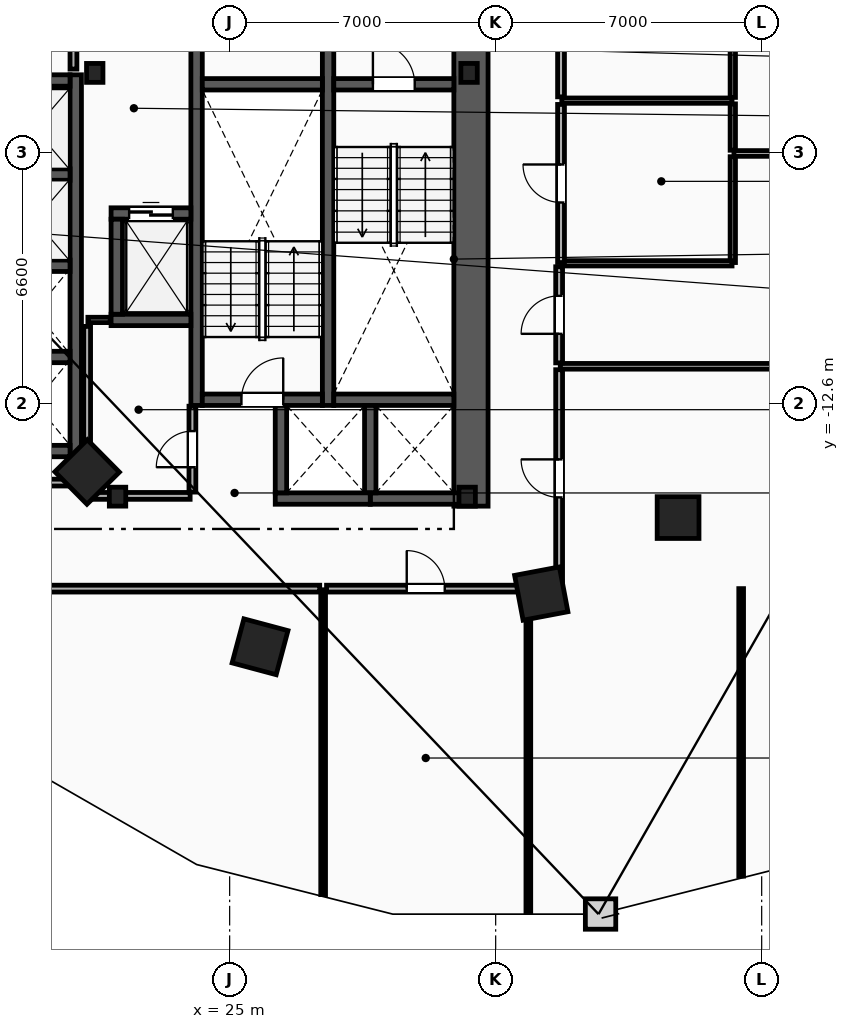
"""IFC4 building model, lengths in metres.
Left out: names, types, materials, properties, quantities, classifications, styles, units other than length and angle.
Written with IfcOpenShell. Run it as: python <this file> out.ifc"""

import sys

from ifc_helpers import new_model, si_unit, direction, frame, frame_2d, origin, origin_2d, place, context, subcontext, project, spatial, rectangle, i_section, extrude, element, fill, save


model = new_model("IFC4")
c1 = context("Model", 3, precision=1e-05, world=origin(), true_north=direction((0.0, 1.0)))
c2 = subcontext(c1, "Body", "Model", "MODEL_VIEW")
j1 = project(units=[si_unit("LENGTHUNIT", "METRE"), si_unit("PLANEANGLEUNIT", "RADIAN")], contexts=[c1])
p1 = place(None, origin())
s1 = spatial("IfcSite", under=j1, at=p1, CompositionType="ELEMENT")
p2 = place(p1, origin())
s2 = spatial("IfcBuilding", under=s1, at=p2, CompositionType="ELEMENT")
p3 = place(p2, frame((0.0, 0.0, 43.0)))
s3 = spatial("IfcBuildingStorey", under=s2, at=p3, CompositionType="ELEMENT", Elevation=43.0)
for number, where, z_axis, x_axis in (
    (1, (31.3, -3.9, 0.0), (0.0, 0.0, 1.0), (1.0, 0.0, 0.0)),
    (2, (21.45, -3.9, 0.0), (0.0, 0.0, 1.0), (1.0, 0.0, 0.0)),
    (3, (22.05, -15.05, 0.0), (0.0, 0.0, 1.0), (1.0, 0.0, 0.0)),
    (4, (31.25, -15.05, 0.0), (0.0, 0.0, 1.0), (1.0, 0.0, 0.0)),
):
    element("IfcColumn", number, at=place(p3, frame(where, z_axis=z_axis, x_axis=x_axis)), inside=s3, PredefinedType="COLUMN", context=c2, shape_type="SweptSolid", body=[
        extrude(i_section(OverallWidth=0.432, OverallDepth=0.498, WebThickness=0.056, FlangeThickness=0.089, FilletRadius=0.018, at=origin_2d()), origin(), (0.0, 0.0, 1.0), 3.8),
    ])
p4 = place(p3, frame((36.8, -15.6, 0.0), z_axis=(0.0, 0.0, 1.0), x_axis=(1.0, 0.0, 0.0)))
e5 = element("IfcColumn", 5, at=p4, inside=s3, PredefinedType="COLUMN", context=c2, shape_type="SweptSolid", body=[
    extrude(rectangle(XDim=1.1, YDim=1.1, at=origin_2d()), origin(), (0.0, 0.0, 1.0), 3.8),
])
for number, where, z_axis, x_axis in (
    (6, (21.25, -14.4, 0.0), (0.0, 0.0, 1.0), (0.703, -0.711, 0.0)),
    (7, (25.8, -19.0, 0.0), (0.0, 0.0, 1.0), (0.966, -0.259, 0.0)),
    (8, (33.2, -17.6, 0.0), (0.0, 0.0, 1.0), (0.983, 0.186, 0.0)),
):
    element("IfcColumn", number, at=place(p3, frame(where, z_axis=z_axis, x_axis=x_axis)), inside=s3, PredefinedType="COLUMN", context=c2, shape_type="SweptSolid", body=[
        extrude(rectangle(XDim=1.2, YDim=1.2, at=origin_2d()), origin(), (0.0, 0.0, 1.0), 3.8),
    ])
p5 = place(p3, frame((31.35, -15.3, 0.0), z_axis=(0.0, 0.0, 1.0), x_axis=(0.0, 1.0, 0.0)))
e9 = element("IfcWall", 9, at=p5, inside=s3, PredefinedType="SHEAR", context=c2, shape_type="SweptSolid", body=[
    extrude(rectangle(XDim=13.33, YDim=0.9, at=frame_2d((6.665, 0.0))), origin(), (0.0, 0.0, 1.0), 3.5),
])
for number, where, z_axis, x_axis in (
    (10, (27.59, -12.65, 0.0), (0.0, 0.0, 1.0), (0.0, 1.0, 0.0)),
    (11, (24.13, -12.65, 0.0), (0.0, 0.0, 1.0), (0.0, 1.0, 0.0)),
):
    element("IfcWall", number, at=place(p3, frame(where, z_axis=z_axis, x_axis=x_axis)), inside=s3, PredefinedType="SHEAR", context=c2, shape_type="SweptSolid", body=[
        extrude(rectangle(XDim=10.68, YDim=0.3, at=frame_2d((5.34, 0.0))), origin(), (0.0, 0.0, 1.0), 3.5),
    ])
p6 = place(p3, frame((27.74, -4.2, 0.0), z_axis=(0.0, 0.0, 1.0), x_axis=(1.0, 0.0, 0.0)))
e12 = element("IfcWall", 12, at=p6, inside=s3, PredefinedType="SHEAR", context=c2, shape_type="SweptSolid", body=[
    extrude(rectangle(XDim=3.16, YDim=0.3, at=frame_2d((1.58, 0.0))), origin(), (0.0, 0.0, 1.0), 3.5),
])
p7 = place(p6, frame((1.03, 0.0, 0.0)))
e13 = element("IfcOpeningElement", 13, at=p7, cuts=e12, PredefinedType="OPENING", context=c2, shape_type="SweptSolid", body=[
    extrude(rectangle(XDim=1.1, YDim=2.15, at=frame_2d((0.55, 1.075))), frame((0.0, 0.16, 0.0), z_axis=(0.0, -1.0, 0.0), x_axis=(1.0, 0.0, 0.0)), (0.0, 0.0, 1.0), 0.32),
])
p8 = place(p3, frame((27.74, -12.5, 0.0), z_axis=(0.0, 0.0, 1.0), x_axis=(1.0, 0.0, 0.0)))
e14 = element("IfcWall", 14, at=p8, inside=s3, PredefinedType="SHEAR", context=c2, shape_type="SweptSolid", body=[
    extrude(rectangle(XDim=3.16, YDim=0.3, at=frame_2d((1.58, 0.0))), origin(), (0.0, 0.0, 1.0), 3.5),
])
p9 = place(p3, frame((24.28, -12.5, 0.0), z_axis=(0.0, 0.0, 1.0), x_axis=(1.0, 0.0, 0.0)))
e15 = element("IfcWall", 15, at=p9, inside=s3, PredefinedType="SHEAR", context=c2, shape_type="SweptSolid", body=[
    extrude(rectangle(XDim=3.16, YDim=0.3, at=frame_2d((1.58, 0.0))), origin(), (0.0, 0.0, 1.0), 3.5),
])
p10 = place(p9, frame((1.03, 0.0, 0.0)))
e16 = element("IfcOpeningElement", 16, at=p10, cuts=e15, PredefinedType="OPENING", context=c2, shape_type="SweptSolid", body=[
    extrude(rectangle(XDim=1.1, YDim=2.15, at=frame_2d((0.55, 1.075))), frame((0.0, 0.16, 0.0), z_axis=(0.0, -1.0, 0.0), x_axis=(1.0, 0.0, 0.0)), (0.0, 0.0, 1.0), 0.32),
])
p11 = place(p3, frame((24.28, -4.2, 0.0), z_axis=(0.0, 0.0, 1.0), x_axis=(1.0, 0.0, 0.0)))
e17 = element("IfcWall", 17, at=p11, inside=s3, PredefinedType="SHEAR", context=c2, shape_type="SweptSolid", body=[
    extrude(rectangle(XDim=3.16, YDim=0.3, at=frame_2d((1.58, 0.0))), origin(), (0.0, 0.0, 1.0), 3.5),
])
p12 = place(p3, frame((20.89, -3.8, 0.0), z_axis=(0.0, 0.0, 1.0), x_axis=(0.0, 1.0, 0.0)))
e18 = element("IfcWall", 18, at=p12, inside=s3, PredefinedType="PARTITIONING", context=c2, shape_type="SweptSolid", body=[
    extrude(rectangle(XDim=1.65, YDim=0.18, at=frame_2d((0.825, 0.0))), origin(), (0.0, 0.0, 1.0), 3.5),
])
p13 = place(p3, frame((21.88, -7.6, 0.0), z_axis=(0.0, 0.0, 1.0), x_axis=(1.0, 0.0, 0.0)))
e19 = element("IfcWall", 19, at=p13, inside=s3, PredefinedType="SHEAR", context=c2, shape_type="SweptSolid", body=[
    extrude(rectangle(XDim=2.1, YDim=0.3, at=frame_2d((1.05, 0.0))), origin(), (0.0, 0.0, 1.0), 3.5),
])
p14 = place(p13, frame((0.475, 0.0, 0.0)))
e20 = element("IfcOpeningElement", 20, at=p14, cuts=e19, PredefinedType="OPENING", context=c2, shape_type="SweptSolid", body=[
    extrude(rectangle(XDim=1.15, YDim=2.2, at=frame_2d((0.575, 1.1))), frame((0.0, 0.16, 0.0), z_axis=(0.0, -1.0, 0.0), x_axis=(1.0, 0.0, 0.0)), (0.0, 0.0, 1.0), 0.32),
])
p15 = place(p3, frame((21.88, -10.4, 0.0), z_axis=(0.0, 0.0, 1.0), x_axis=(1.0, 0.0, 0.0)))
e21 = element("IfcWall", 21, at=p15, inside=s3, PredefinedType="SHEAR", context=c2, shape_type="SweptSolid", body=[
    extrude(rectangle(XDim=2.1, YDim=0.3, at=frame_2d((1.05, 0.0))), origin(), (0.0, 0.0, 1.0), 3.5),
])
for number, where, z_axis, x_axis in (
    (22, (22.03, -10.25, 0.0), (0.0, 0.0, 1.0), (0.0, 1.0, 0.0)),
    (23, (28.7, -15.1, 0.0), (0.0, 0.0, 1.0), (1.0, 0.0, 0.0)),
):
    element("IfcWall", number, at=place(p3, frame(where, z_axis=z_axis, x_axis=x_axis)), inside=s3, PredefinedType="SHEAR", context=c2, shape_type="SweptSolid", body=[
        extrude(rectangle(XDim=2.5, YDim=0.3, at=frame_2d((1.25, 0.0))), origin(), (0.0, 0.0, 1.0), 3.5),
    ])
p16 = place(p3, frame((28.7, -14.95, 0.0), z_axis=(0.0, 0.0, 1.0), x_axis=(0.0, 1.0, 0.0)))
e24 = element("IfcWall", 24, at=p16, inside=s3, PredefinedType="SHEAR", context=c2, shape_type="SweptSolid", body=[
    extrude(rectangle(XDim=2.3, YDim=0.3, at=frame_2d((1.15, 0.0))), origin(), (0.0, 0.0, 1.0), 3.5),
])
p17 = place(p3, frame((26.2, -15.1, 0.0), z_axis=(0.0, 0.0, 1.0), x_axis=(1.0, 0.0, 0.0)))
e25 = element("IfcWall", 25, at=p17, inside=s3, PredefinedType="SHEAR", context=c2, shape_type="SweptSolid", body=[
    extrude(rectangle(XDim=2.5, YDim=0.3, at=frame_2d((1.25, 0.0))), origin(), (0.0, 0.0, 1.0), 3.5),
])
p18 = place(p3, frame((26.35, -14.95, 0.0), z_axis=(0.0, 0.0, 1.0), x_axis=(0.0, 1.0, 0.0)))
e26 = element("IfcWall", 26, at=p18, inside=s3, PredefinedType="SHEAR", context=c2, shape_type="SweptSolid", body=[
    extrude(rectangle(XDim=2.3, YDim=0.3, at=frame_2d((1.15, 0.0))), origin(), (0.0, 0.0, 1.0), 3.5),
])
p19 = place(p3, frame((20.95, -14.0, 0.0), z_axis=(0.0, 0.0, 1.0), x_axis=(0.0, 1.0, 0.0)))
e27 = element("IfcWall", 27, at=p19, inside=s3, PredefinedType="SHEAR", context=c2, shape_type="SweptSolid", body=[
    extrude(rectangle(XDim=10.05, YDim=0.3, at=frame_2d((5.025, 0.0))), origin(), (0.0, 0.0, 1.0), 3.5),
])
p20 = place(p3, frame((18.95, -13.85, 0.0), z_axis=(0.0, 0.0, 1.0), x_axis=(1.0, 0.0, 0.0)))
e28 = element("IfcWall", 28, at=p20, inside=s3, PredefinedType="SHEAR", context=c2, shape_type="SweptSolid", body=[
    extrude(rectangle(XDim=1.85, YDim=0.3, at=frame_2d((0.925, 0.0))), origin(), (0.0, 0.0, 1.0), 3.5),
])
p21 = place(p3, frame((18.65, -4.1, 0.0), z_axis=(0.0, 0.0, 1.0), x_axis=(1.0, 0.0, 0.0)))
e29 = element("IfcWall", 29, at=p21, inside=s3, PredefinedType="SHEAR", context=c2, shape_type="SweptSolid", body=[
    extrude(rectangle(XDim=2.15, YDim=0.3, at=frame_2d((1.075, 0.0))), origin(), (0.0, 0.0, 1.0), 3.5),
])
for number, where, z_axis, x_axis in (
    (30, (18.95, -11.375, 0.0), (0.0, 0.0, 1.0), (1.0, 0.0, 0.0)),
    (31, (18.95, -8.975, 0.0), (0.0, 0.0, 1.0), (1.0, 0.0, 0.0)),
    (32, (18.95, -6.575, 0.0), (0.0, 0.0, 1.0), (1.0, 0.0, 0.0)),
):
    element("IfcWall", number, at=place(p3, frame(where, z_axis=z_axis, x_axis=x_axis)), inside=s3, PredefinedType="SHEAR", context=c2, shape_type="SweptSolid", body=[
        extrude(rectangle(XDim=1.85, YDim=0.3, at=frame_2d((0.925, 0.0))), origin(), (0.0, 0.0, 1.0), 3.5),
    ])
p22 = place(p3, frame((21.27, -10.4, 0.0), z_axis=(0.0, 0.0, 1.0), x_axis=(1.0, 0.0, 0.0)))
e33 = element("IfcWall", 33, at=p22, inside=s3, PredefinedType="PARTITIONING", context=c2, shape_type="SweptSolid", body=[
    extrude(rectangle(XDim=0.59, YDim=0.14, at=frame_2d((0.295, 0.0))), origin(), (0.0, 0.0, 1.0), 3.5),
])
p23 = place(p3, frame((21.25, -14.93, 0.0), z_axis=(0.0, 0.0, 1.0), x_axis=(0.0, 1.0, 0.0)))
e34 = element("IfcWall", 34, at=p23, inside=s3, PredefinedType="PARTITIONING", context=c2, shape_type="SweptSolid", body=[
    extrude(rectangle(XDim=4.36, YDim=0.18, at=frame_2d((2.18, 0.0))), origin(), (0.0, 0.0, 1.0), 3.5),
])
p24 = place(p3, frame((21.35, -15.03, 0.0), z_axis=(0.0, 0.0, 1.0), x_axis=(1.0, 0.0, 0.0)))
e35 = element("IfcWall", 35, at=p24, inside=s3, PredefinedType="PARTITIONING", context=c2, shape_type="SweptSolid", body=[
    extrude(rectangle(XDim=2.61, YDim=0.18, at=frame_2d((1.305, 0.0))), origin(), (0.0, 0.0, 1.0), 2.573),
])
p25 = place(p3, frame((24.02, -14.93, 0.0), z_axis=(0.0, 0.0, 1.0), x_axis=(0.0, 1.0, 0.0)))
e36 = element("IfcWall", 36, at=p25, inside=s3, PredefinedType="PARTITIONING", context=c2, shape_type="SweptSolid", body=[
    extrude(rectangle(XDim=2.26, YDim=0.18, at=frame_2d((1.13, 0.0))), origin(), (0.0, 0.0, 1.0), 3.5),
])
p26 = place(p25, frame((0.655, 0.0, 0.0)))
e37 = element("IfcOpeningElement", 37, at=p26, cuts=e36, PredefinedType="OPENING", context=c2, shape_type="SweptSolid", body=[
    extrude(rectangle(XDim=0.95, YDim=2.1, at=frame_2d((0.475, 1.05))), frame((0.0, 0.1, 0.0), z_axis=(0.0, -1.0, 0.0), x_axis=(1.0, 0.0, 0.0)), (0.0, 0.0, 1.0), 0.2),
])
p27 = place(p3, frame((38.24, -8.89, 0.0), z_axis=(0.0, 0.0, 1.0), x_axis=(0.0, 1.0, 0.0)))
e38 = element("IfcWall", 38, at=p27, inside=s3, PredefinedType="PARTITIONING", context=c2, shape_type="SweptSolid", body=[
    extrude(rectangle(XDim=2.785, YDim=0.14, at=frame_2d((1.393, 0.0))), origin(), (0.0, 0.0, 1.0), 3.5),
])
p28 = place(p3, frame((38.24, -5.935, 0.0), z_axis=(0.0, 0.0, 1.0), x_axis=(0.0, 1.0, 0.0)))
e39 = element("IfcWall", 39, at=p28, inside=s3, PredefinedType="PARTITIONING", context=c2, shape_type="SweptSolid", body=[
    extrude(rectangle(XDim=1.22, YDim=0.14, at=frame_2d((0.61, 0.0))), origin(), (0.0, 0.0, 1.0), 3.5),
])
p29 = place(p3, frame((38.24, -4.545, 0.0), z_axis=(0.0, 0.0, 1.0), x_axis=(0.0, 1.0, 0.0)))
e40 = element("IfcWall", 40, at=p29, inside=s3, PredefinedType="PARTITIONING", context=c2, shape_type="SweptSolid", body=[
    extrude(rectangle(XDim=4.275, YDim=0.14, at=frame_2d((2.137, 0.0))), origin(), (0.0, 0.0, 1.0), 3.5),
])
for number, where, z_axis, x_axis in (
    (41, (33.74, -4.63, 0.0), (0.0, 0.0, 1.0), (1.0, 0.0, 0.0)),
    (42, (33.74, -8.91, 0.0), (0.0, 0.0, 1.0), (1.0, 0.0, 0.0)),
):
    element("IfcWall", number, at=place(p3, frame(where, z_axis=z_axis, x_axis=x_axis)), inside=s3, PredefinedType="PARTITIONING", context=c2, shape_type="SweptSolid", body=[
        extrude(rectangle(XDim=4.48, YDim=0.14, at=frame_2d((2.24, 0.0))), origin(), (0.0, 0.0, 1.0), 3.5),
    ])
p30 = place(p3, frame((33.72, -4.53, 0.0), z_axis=(0.0, 0.0, 1.0), x_axis=(0.0, 1.0, 0.0)))
e43 = element("IfcWall", 43, at=p30, inside=s3, PredefinedType="PARTITIONING", context=c2, shape_type="SweptSolid", body=[
    extrude(rectangle(XDim=4.26, YDim=0.18, at=frame_2d((2.13, 0.0))), origin(), (0.0, 0.0, 1.0), 3.5),
])
p31 = place(p30, frame((1.655, 0.0, 0.0)))
e44 = element("IfcOpeningElement", 44, at=p31, cuts=e43, PredefinedType="OPENING", context=c2, shape_type="SweptSolid", body=[
    extrude(rectangle(XDim=0.95, YDim=2.1, at=frame_2d((0.475, 1.05))), frame((0.0, 0.1, 0.0), z_axis=(0.0, -1.0, 0.0), x_axis=(1.0, 0.0, 0.0)), (0.0, 0.0, 1.0), 0.2),
])
p32 = place(p3, frame((33.72, -8.89, 0.0), z_axis=(0.0, 0.0, 1.0), x_axis=(0.0, 1.0, 0.0)))
e45 = element("IfcWall", 45, at=p32, inside=s3, PredefinedType="PARTITIONING", context=c2, shape_type="SweptSolid", body=[
    extrude(rectangle(XDim=4.16, YDim=0.18, at=frame_2d((2.08, 0.0))), origin(), (0.0, 0.0, 1.0), 3.5),
])
p33 = place(p32, frame((1.58, 0.0, 0.0)))
e46 = element("IfcOpeningElement", 46, at=p33, cuts=e45, PredefinedType="OPENING", context=c2, shape_type="SweptSolid", body=[
    extrude(rectangle(XDim=1.0, YDim=2.15, at=frame_2d((0.5, 1.075))), frame((0.0, 0.1, 0.0), z_axis=(0.0, -1.0, 0.0), x_axis=(1.0, 0.0, 0.0)), (0.0, 0.0, 1.0), 0.2),
])
p34 = place(p3, frame((38.27, -6.02, 0.0), z_axis=(0.0, 0.0, 1.0), x_axis=(1.0, 0.0, 0.0)))
e47 = element("IfcWall", 47, at=p34, inside=s3, PredefinedType="PARTITIONING", context=c2, shape_type="SweptSolid", body=[
    extrude(rectangle(XDim=12.72, YDim=0.15, at=frame_2d((6.36, 0.0))), origin(), (0.0, 0.0, 1.0), 3.5),
])
p35 = place(p3, frame((33.7, -11.62, 0.0), z_axis=(0.0, 0.0, 1.0), x_axis=(1.0, 0.0, 0.0)))
e48 = element("IfcWall", 48, at=p35, inside=s3, PredefinedType="PARTITIONING", context=c2, shape_type="SweptSolid", body=[
    extrude(rectangle(XDim=16.494, YDim=0.15, at=frame_2d((8.247, 0.0))), origin(), (0.0, 0.0, 1.0), 3.5),
])
p36 = place(p3, frame((27.46, -25.521, 0.0), z_axis=(0.0, 0.0, 1.0), x_axis=(0.0, 1.0, 0.0)))
e49 = element("IfcWall", 49, at=p36, inside=s3, PredefinedType="PARTITIONING", context=c2, shape_type="SweptSolid", body=[
    extrude(rectangle(XDim=8.021, YDim=0.125, at=frame_2d((4.01, 0.0))), origin(), (0.0, 0.0, 1.0), 3.5),
])
p37 = place(p3, frame((32.86, -25.985, 0.0), z_axis=(0.0, 0.0, 1.0), x_axis=(0.0, 1.0, 0.0)))
e50 = element("IfcWall", 50, at=p37, inside=s3, PredefinedType="PARTITIONING", context=c2, shape_type="SweptSolid", body=[
    extrude(rectangle(XDim=8.485, YDim=0.125, at=frame_2d((4.243, 0.0))), origin(), (0.0, 0.0, 1.0), 3.5),
])
p38 = place(p3, frame((38.46, -25.035, 0.0), z_axis=(0.0, 0.0, 1.0), x_axis=(0.0, 1.0, 0.0)))
e51 = element("IfcWall", 51, at=p38, inside=s3, PredefinedType="PARTITIONING", context=c2, shape_type="SweptSolid", body=[
    extrude(rectangle(XDim=7.565, YDim=0.125, at=frame_2d((3.783, 0.0))), origin(), (0.0, 0.0, 1.0), 3.5),
])
p39 = place(p3, frame((27.55, -17.47, 0.0), z_axis=(0.0, 0.0, 1.0), x_axis=(1.0, 0.0, 0.0)))
e52 = element("IfcWall", 52, at=p39, inside=s3, PredefinedType="PARTITIONING", context=c2, shape_type="SweptSolid", body=[
    extrude(rectangle(XDim=5.22, YDim=0.18, at=frame_2d((2.61, 0.0))), origin(), (0.0, 0.0, 1.0), 3.5),
])
p40 = place(p39, frame((2.11, 0.0, 0.0)))
e53 = element("IfcOpeningElement", 53, at=p40, cuts=e52, PredefinedType="OPENING", context=c2, shape_type="SweptSolid", body=[
    extrude(rectangle(XDim=1.0, YDim=2.15, at=frame_2d((0.5, 1.075))), frame((0.0, 0.1, 0.0), z_axis=(0.0, -1.0, 0.0), x_axis=(1.0, 0.0, 0.0)), (0.0, 0.0, 1.0), 0.2),
])
p41 = place(p3, frame((33.67, -17.428, 0.0), z_axis=(0.0, 0.0, 1.0), x_axis=(0.0, 1.0, 0.0)))
e54 = element("IfcWall", 54, at=p41, inside=s3, PredefinedType="PARTITIONING", context=c2, shape_type="SweptSolid", body=[
    extrude(rectangle(XDim=5.719, YDim=0.18, at=frame_2d((2.859, 0.0))), origin(), (0.0, 0.0, 1.0), 3.5),
])
p42 = place(p41, frame((2.359, 0.0, 0.0)))
e55 = element("IfcOpeningElement", 55, at=p42, cuts=e54, PredefinedType="OPENING", context=c2, shape_type="SweptSolid", body=[
    extrude(rectangle(XDim=1.0, YDim=2.15, at=frame_2d((0.5, 1.075))), frame((0.0, 0.1, 0.0), z_axis=(0.0, -1.0, 0.0), x_axis=(1.0, 0.0, 0.0)), (0.0, 0.0, 1.0), 0.2),
])
p43 = place(p3, frame((32.95, -17.47, 0.0), z_axis=(0.0, 0.0, 1.0), x_axis=(1.0, 0.0, 0.0)))
e56 = element("IfcWall", 56, at=p43, inside=s3, PredefinedType="PARTITIONING", context=c2, shape_type="SweptSolid", body=[
    extrude(rectangle(XDim=0.678, YDim=0.18, at=frame_2d((0.339, 0.0))), origin(), (0.0, 0.0, 1.0), 3.5),
])
p44 = place(p3, frame((33.67, -11.53, 0.0), z_axis=(0.0, 0.0, 1.0), x_axis=(0.0, 1.0, 0.0)))
e57 = element("IfcWall", 57, at=p44, inside=s3, PredefinedType="PARTITIONING", context=c2, shape_type="SweptSolid", body=[
    extrude(rectangle(XDim=2.529, YDim=0.18, at=frame_2d((1.264, 0.0))), origin(), (0.0, 0.0, 1.0), 3.5),
])
p45 = place(p44, frame((0.764, 0.0, 0.0)))
e58 = element("IfcOpeningElement", 58, at=p45, cuts=e57, PredefinedType="OPENING", context=c2, shape_type="SweptSolid", body=[
    extrude(rectangle(XDim=1.0, YDim=2.15, at=frame_2d((0.5, 1.075))), frame((0.0, 0.1, 0.0), z_axis=(0.0, -1.0, 0.0), x_axis=(1.0, 0.0, 0.0)), (0.0, 0.0, 1.0), 0.2),
])
p46 = place(p3, frame((16.822, -17.47, 0.0), z_axis=(0.0, 0.0, 1.0), x_axis=(1.0, 0.0, 0.0)))
e59 = element("IfcWall", 59, at=p46, inside=s3, PredefinedType="PARTITIONING", context=c2, shape_type="SweptSolid", body=[
    extrude(rectangle(XDim=10.549, YDim=0.18, at=frame_2d((5.274, 0.0))), origin(), (0.0, 0.0, 1.0), 3.5),
])
p47 = place(p3, frame((21.178, -14.68, 0.0), z_axis=(0.0, 0.0, 1.0), x_axis=(-1.0, 0.0, 0.0)))
e60 = element("IfcWall", 60, at=p47, inside=s3, PredefinedType="PARTITIONING", context=c2, shape_type="SweptSolid", body=[
    extrude(rectangle(XDim=4.357, YDim=0.18, at=frame_2d((2.178, 0.0))), origin(), (0.0, 0.0, 1.0), 3.5),
])
p48 = place(p7, origin())
e61 = element("IfcDoor", 61, at=p48, inside=s3, OperationType="SINGLE_SWING_LEFT", PredefinedType="DOOR", context=c2, shape_type="SweptSolid", body=[
    extrude(rectangle(XDim=1.1, YDim=2.15, at=frame_2d((0.55, 1.075))), frame((0.0, 0.025, 0.0), z_axis=(0.0, -1.0, 0.0), x_axis=(1.0, 0.0, 0.0)), (0.0, 0.0, 1.0), 0.05),
])
fill(e13, e61)
p49 = place(p10, origin())
e62 = element("IfcDoor", 62, at=p49, inside=s3, OperationType="SINGLE_SWING_RIGHT", PredefinedType="DOOR", context=c2, shape_type="SweptSolid", body=[
    extrude(rectangle(XDim=1.1, YDim=2.15, at=frame_2d((0.55, 1.075))), frame((0.0, 0.025, 0.0), z_axis=(0.0, -1.0, 0.0), x_axis=(1.0, 0.0, 0.0)), (0.0, 0.0, 1.0), 0.05),
])
fill(e16, e62)
p50 = place(p14, origin())
e63 = element("IfcDoor", 63, at=p50, inside=s3, OperationType="SLIDING_TO_LEFT", PredefinedType="TRAPDOOR", context=c2, shape_type="SweptSolid", body=[
    extrude(rectangle(XDim=1.15, YDim=2.2, at=frame_2d((0.575, 1.1))), frame((0.0, 0.025, 0.0), z_axis=(0.0, -1.0, 0.0), x_axis=(1.0, 0.0, 0.0)), (0.0, 0.0, 1.0), 0.05),
])
fill(e20, e63)
p51 = place(p42, origin())
e64 = element("IfcDoor", 64, at=p51, inside=s3, OperationType="SINGLE_SWING_RIGHT", PredefinedType="DOOR", context=c2, shape_type="SweptSolid", body=[
    extrude(rectangle(XDim=1.0, YDim=2.15, at=frame_2d((0.5, 1.075))), frame((0.0, 0.025, 0.0), z_axis=(0.0, -1.0, 0.0), x_axis=(1.0, 0.0, 0.0)), (0.0, 0.0, 1.0), 0.05),
])
fill(e55, e64)
p52 = place(p40, origin())
e65 = element("IfcDoor", 65, at=p52, inside=s3, OperationType="SINGLE_SWING_LEFT", PredefinedType="DOOR", context=c2, shape_type="SweptSolid", body=[
    extrude(rectangle(XDim=1.0, YDim=2.15, at=frame_2d((0.5, 1.075))), frame((0.0, 0.025, 0.0), z_axis=(0.0, -1.0, 0.0), x_axis=(1.0, 0.0, 0.0)), (0.0, 0.0, 1.0), 0.05),
])
fill(e53, e65)
p53 = place(p33, origin())
e66 = element("IfcDoor", 66, at=p53, inside=s3, OperationType="SINGLE_SWING_RIGHT", PredefinedType="DOOR", context=c2, shape_type="SweptSolid", body=[
    extrude(rectangle(XDim=1.0, YDim=2.15, at=frame_2d((0.5, 1.075))), frame((0.0, 0.025, 0.0), z_axis=(0.0, -1.0, 0.0), x_axis=(1.0, 0.0, 0.0)), (0.0, 0.0, 1.0), 0.05),
])
fill(e46, e66)
p54 = place(p45, origin())
e67 = element("IfcDoor", 67, at=p54, inside=s3, OperationType="SINGLE_SWING_LEFT", PredefinedType="DOOR", context=c2, shape_type="SweptSolid", body=[
    extrude(rectangle(XDim=1.0, YDim=2.15, at=frame_2d((0.5, 1.075))), frame((0.0, 0.025, 0.0), z_axis=(0.0, -1.0, 0.0), x_axis=(1.0, 0.0, 0.0)), (0.0, 0.0, 1.0), 0.05),
])
fill(e58, e67)
p55 = place(p26, origin())
e68 = element("IfcDoor", 68, at=p55, inside=s3, OperationType="SINGLE_SWING_LEFT", PredefinedType="DOOR", context=c2, shape_type="SweptSolid", body=[
    extrude(rectangle(XDim=0.95, YDim=2.1, at=frame_2d((0.475, 1.05))), frame((0.0, 0.025, 0.0), z_axis=(0.0, -1.0, 0.0), x_axis=(1.0, 0.0, 0.0)), (0.0, 0.0, 1.0), 0.05),
])
fill(e37, e68)
save(model, sys.argv[1])
